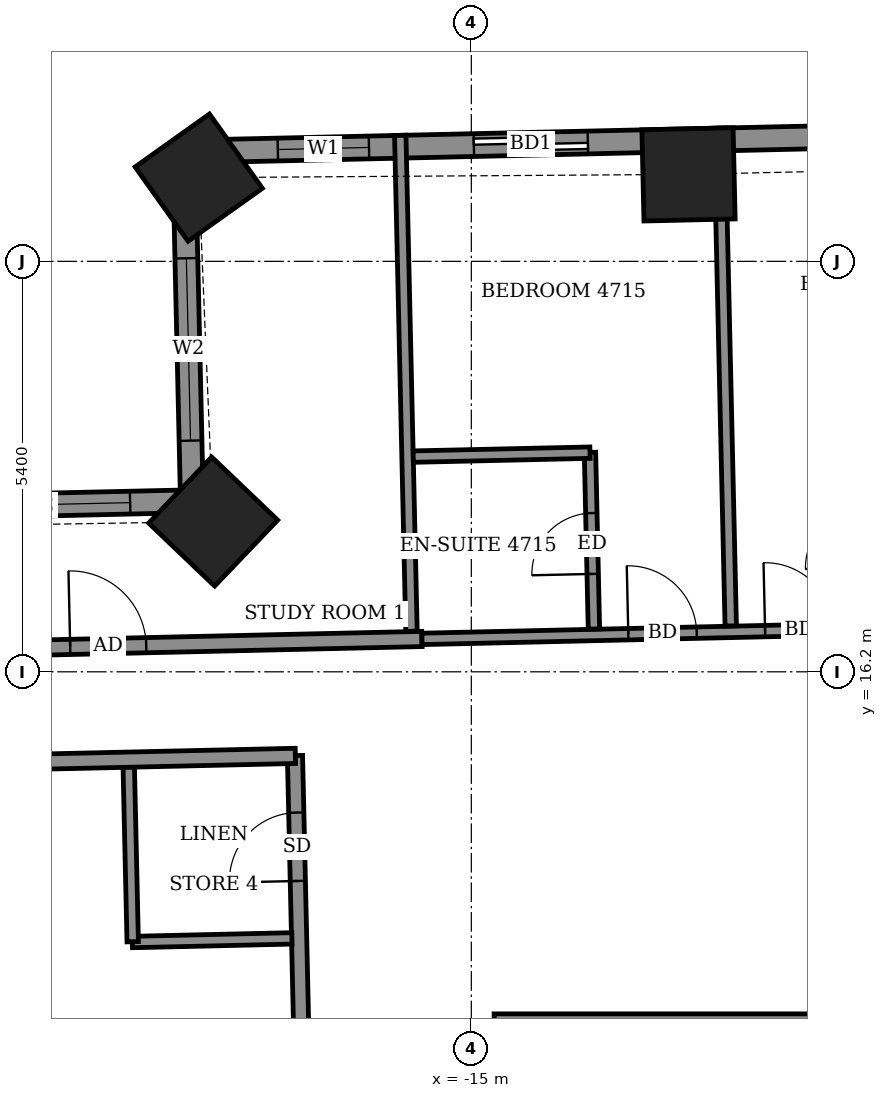
"""IFC4 building model, lengths in metres.
Left out: names, types, materials, properties, quantities, classifications, styles, units other than length and angle.
Written with IfcOpenShell. Run it as: python <this file> out.ifc"""

import sys

from ifc_helpers import new_model, si_unit, direction, frame, frame_2d, origin, origin_2d, place, context, subcontext, project, spatial, rectangle, extrude, element, fill, save


model = new_model("IFC4")
c1 = context("Model", 3, precision=1e-05, world=origin(), true_north=direction((0.0, 1.0)))
c2 = subcontext(c1, "Body", "Model", "MODEL_VIEW")
j1 = project(units=[si_unit("LENGTHUNIT", "METRE"), si_unit("PLANEANGLEUNIT", "RADIAN")], contexts=[c1])
p1 = place(None, origin())
s1 = spatial("IfcSite", under=j1, at=p1, CompositionType="ELEMENT")
p2 = place(p1, origin())
s2 = spatial("IfcBuilding", under=s1, at=p2, CompositionType="ELEMENT")
p3 = place(p2, frame((0.0, 0.0, 186.1)))
s3 = spatial("IfcBuildingStorey", under=s2, at=p3, CompositionType="ELEMENT", Elevation=186.1)
for number, where, z_axis, x_axis in (
    (1, (-12.142, 22.744, -0.55), (0.0, 0.0, 1.0), (-1.0, -0.023, 0.0)),
    (2, (-18.586, 22.701, -0.55), (0.0, 0.0, 1.0), (-0.815, -0.58, 0.0)),
    (3, (-18.396, 18.177, -0.55), (0.0, 0.0, 1.0), (-0.691, -0.723, 0.0)),
):
    element("IfcColumn", number, at=place(p3, frame(where, z_axis=z_axis, x_axis=x_axis)), inside=s3, PredefinedType="COLUMN", context=c2, shape_type="SweptSolid", body=[
        extrude(rectangle(XDim=1.2, YDim=1.2, at=origin_2d()), origin(), (0.0, 0.0, 1.0), 3.6),
    ])
p4 = place(p3, frame((21.589, 23.959, 0.0), z_axis=(0.0, 0.0, 1.0), x_axis=(-0.999742671382, -0.022684598702, 0.0)))
e4 = element("IfcWall", 4, at=p4, inside=s3, PredefinedType="SOLIDWALL", context=c2, shape_type="SweptSolid", body=[
    extrude(rectangle(XDim=40.381, YDim=0.3, at=frame_2d((20.19, 0.0))), origin(), (0.0, 0.0, 1.0), 3.05),
])
p5 = place(p4, frame((1.553, 0.0, 0.0)))
e5 = element("IfcOpeningElement", 5, at=p5, cuts=e4, PredefinedType="OPENING", context=c2, shape_type="SweptSolid", body=[
    extrude(rectangle(XDim=1.5, YDim=2.4, at=frame_2d((0.75, 1.2))), frame((0.0, 0.16, 0.0), z_axis=(0.0, -1.0, 0.0), x_axis=(1.0, 0.0, 0.0)), (0.0, 0.0, 1.0), 0.32),
])
p6 = place(p4, frame((4.33, 0.0, 0.0)))
e6 = element("IfcOpeningElement", 6, at=p6, cuts=e4, PredefinedType="OPENING", context=c2, shape_type="SweptSolid", body=[
    extrude(rectangle(XDim=1.5, YDim=2.4, at=frame_2d((0.75, 1.2))), frame((0.0, 0.16, 0.0), z_axis=(0.0, -1.0, 0.0), x_axis=(1.0, 0.0, 0.0)), (0.0, 0.0, 1.0), 0.32),
])
p7 = place(p4, frame((9.43, 0.0, 0.0)))
e7 = element("IfcOpeningElement", 7, at=p7, cuts=e4, PredefinedType="OPENING", context=c2, shape_type="SweptSolid", body=[
    extrude(rectangle(XDim=1.5, YDim=2.4, at=frame_2d((0.75, 1.2))), frame((0.0, 0.16, 0.0), z_axis=(0.0, -1.0, 0.0), x_axis=(1.0, 0.0, 0.0)), (0.0, 0.0, 1.0), 0.32),
])
p8 = place(p4, frame((14.37, 0.0, 0.0)))
e8 = element("IfcOpeningElement", 8, at=p8, cuts=e4, PredefinedType="OPENING", context=c2, shape_type="SweptSolid", body=[
    extrude(rectangle(XDim=1.5, YDim=2.4, at=frame_2d((0.75, 1.2))), frame((0.0, 0.16, 0.0), z_axis=(0.0, -1.0, 0.0), x_axis=(1.0, 0.0, 0.0)), (0.0, 0.0, 1.0), 0.32),
])
p9 = place(p4, frame((17.41, 0.0, 0.0)))
e9 = element("IfcOpeningElement", 9, at=p9, cuts=e4, PredefinedType="OPENING", context=c2, shape_type="SweptSolid", body=[
    extrude(rectangle(XDim=1.5, YDim=2.4, at=frame_2d((0.75, 1.2))), frame((0.0, 0.16, 0.0), z_axis=(0.0, -1.0, 0.0), x_axis=(1.0, 0.0, 0.0)), (0.0, 0.0, 1.0), 0.32),
])
p10 = place(p4, frame((22.03, 0.0, 0.0)))
e10 = element("IfcOpeningElement", 10, at=p10, cuts=e4, PredefinedType="OPENING", context=c2, shape_type="SweptSolid", body=[
    extrude(rectangle(XDim=1.5, YDim=2.4, at=frame_2d((0.75, 1.2))), frame((0.0, 0.16, 0.0), z_axis=(0.0, -1.0, 0.0), x_axis=(1.0, 0.0, 0.0)), (0.0, 0.0, 1.0), 0.32),
])
p11 = place(p4, frame((27.7, 0.0, 0.0)))
e11 = element("IfcOpeningElement", 11, at=p11, cuts=e4, PredefinedType="OPENING", context=c2, shape_type="SweptSolid", body=[
    extrude(rectangle(XDim=1.2, YDim=2.4, at=frame_2d((0.6, 1.2))), frame((0.0, 0.16, 0.0), z_axis=(0.0, -1.0, 0.0), x_axis=(1.0, 0.0, 0.0)), (0.0, 0.0, 1.0), 0.32),
])
p12 = place(p4, frame((30.48, 0.0, 0.0)))
e12 = element("IfcOpeningElement", 12, at=p12, cuts=e4, PredefinedType="OPENING", context=c2, shape_type="SweptSolid", body=[
    extrude(rectangle(XDim=1.5, YDim=2.4, at=frame_2d((0.75, 1.2))), frame((0.0, 0.16, 0.0), z_axis=(0.0, -1.0, 0.0), x_axis=(1.0, 0.0, 0.0)), (0.0, 0.0, 1.0), 0.32),
])
p13 = place(p4, frame((35.065, 0.0, 0.0)))
e13 = element("IfcOpeningElement", 13, at=p13, cuts=e4, PredefinedType="OPENING", context=c2, shape_type="SweptSolid", body=[
    extrude(rectangle(XDim=1.5, YDim=2.4, at=frame_2d((0.75, 1.2))), frame((0.0, 0.16, 0.0), z_axis=(0.0, -1.0, 0.0), x_axis=(1.0, 0.0, 0.0)), (0.0, 0.0, 1.0), 0.32),
])
p14 = place(p4, frame((37.945, 0.0, 0.9)))
e14 = element("IfcOpeningElement", 14, at=p14, cuts=e4, PredefinedType="OPENING", context=c2, shape_type="SweptSolid", body=[
    extrude(rectangle(XDim=1.2, YDim=1.5, at=frame_2d((0.6, 0.75))), frame((0.0, 0.16, 0.0), z_axis=(0.0, -1.0, 0.0), x_axis=(1.0, 0.0, 0.0)), (0.0, 0.0, 1.0), 0.32),
])
p15 = place(p3, frame((-18.781, 23.043, 0.0), z_axis=(0.0, 0.0, 1.0), x_axis=(0.022821468877, -0.999739556364, 0.0)))
e15 = element("IfcWall", 15, at=p15, inside=s3, PredefinedType="SOLIDWALL", context=c2, shape_type="SweptSolid", body=[
    extrude(rectangle(XDim=4.6, YDim=0.3, at=frame_2d((2.3, 0.0))), origin(), (0.0, 0.0, 1.0), 2.55),
])
p16 = place(p15, frame((1.403, 0.0, 0.9)))
e16 = element("IfcOpeningElement", 16, at=p16, cuts=e15, PredefinedType="OPENING", context=c2, shape_type="SweptSolid", body=[
    extrude(rectangle(XDim=2.4, YDim=1.5, at=frame_2d((1.2, 0.75))), frame((0.0, 0.16, 0.0), z_axis=(0.0, -1.0, 0.0), x_axis=(1.0, 0.0, 0.0)), (0.0, 0.0, 1.0), 0.32),
])
p17 = place(p3, frame((-18.676, 18.444, 0.0), z_axis=(0.0, 0.0, 1.0), x_axis=(-0.999744377441, -0.022609285172, 0.0)))
e17 = element("IfcWall", 17, at=p17, inside=s3, PredefinedType="SOLIDWALL", context=c2, shape_type="SweptSolid", body=[
    extrude(rectangle(XDim=4.6, YDim=0.3, at=frame_2d((2.3, 0.0))), origin(), (0.0, 0.0, 1.0), 2.55),
])
p18 = place(p17, frame((0.813, 0.0, 0.9)))
e18 = element("IfcOpeningElement", 18, at=p18, cuts=e17, PredefinedType="OPENING", context=c2, shape_type="SweptSolid", body=[
    extrude(rectangle(XDim=2.4, YDim=1.5, at=frame_2d((1.2, 0.75))), frame((0.0, 0.16, 0.0), z_axis=(0.0, -1.0, 0.0), x_axis=(1.0, 0.0, 0.0)), (0.0, 0.0, 1.0), 0.32),
])
p19 = place(p3, frame((-16.684, -12.919, 0.0), z_axis=(0.0, 0.0, 1.0), x_axis=(-0.022694293906, 0.999742451346, 0.0)))
e19 = element("IfcWall", 19, at=p19, inside=s3, PredefinedType="PARTITIONING", context=c2, shape_type="SweptSolid", body=[
    extrude(rectangle(XDim=28.024, YDim=0.2, at=frame_2d((14.012, 0.0))), origin(), (0.0, 0.0, 1.0), 3.05),
])
p20 = place(p19, frame((22.825, 0.0, 0.0)))
e20 = element("IfcOpeningElement", 20, at=p20, cuts=e19, PredefinedType="OPENING", context=c2, shape_type="SweptSolid", body=[
    extrude(rectangle(XDim=1.0, YDim=2.1, at=frame_2d((0.5, 1.05))), frame((0.0, 0.11, 0.0), z_axis=(0.0, -1.0, 0.0), x_axis=(1.0, 0.0, 0.0)), (0.0, 0.0, 1.0), 0.22),
])
p21 = place(p19, frame((26.374, 0.0, 0.0)))
e21 = element("IfcOpeningElement", 21, at=p21, cuts=e19, PredefinedType="OPENING", context=c2, shape_type="SweptSolid", body=[
    extrude(rectangle(XDim=0.9, YDim=2.1, at=frame_2d((0.45, 1.05))), frame((0.0, 0.11, 0.0), z_axis=(0.0, -1.0, 0.0), x_axis=(1.0, 0.0, 0.0)), (0.0, 0.0, 1.0), 0.22),
])
p22 = place(p19, frame((16.7, 0.0, 0.0)))
e22 = element("IfcOpeningElement", 22, at=p22, cuts=e19, PredefinedType="OPENING", context=c2, shape_type="SweptSolid", body=[
    extrude(rectangle(XDim=1.0, YDim=2.1, at=frame_2d((0.5, 1.05))), frame((0.0, 0.11, 0.0), z_axis=(0.0, -1.0, 0.0), x_axis=(1.0, 0.0, 0.0)), (0.0, 0.0, 1.0), 0.22),
])
p23 = place(p19, frame((19.175, 0.0, 0.0)))
e23 = element("IfcOpeningElement", 23, at=p23, cuts=e19, PredefinedType="OPENING", context=c2, shape_type="SweptSolid", body=[
    extrude(rectangle(XDim=0.9, YDim=2.1, at=frame_2d((0.45, 1.05))), frame((0.0, 0.11, 0.0), z_axis=(0.0, -1.0, 0.0), x_axis=(1.0, 0.0, 0.0)), (0.0, 0.0, 1.0), 0.22),
])
p24 = place(p19, frame((14.725, 0.0, 0.0)))
e24 = element("IfcOpeningElement", 24, at=p24, cuts=e19, PredefinedType="OPENING", context=c2, shape_type="SweptSolid", body=[
    extrude(rectangle(XDim=1.0, YDim=2.1, at=frame_2d((0.5, 1.05))), frame((0.0, 0.11, 0.0), z_axis=(0.0, -1.0, 0.0), x_axis=(1.0, 0.0, 0.0)), (0.0, 0.0, 1.0), 0.22),
])
p25 = place(p19, frame((12.625, 0.0, 0.0)))
e25 = element("IfcOpeningElement", 25, at=p25, cuts=e19, PredefinedType="OPENING", context=c2, shape_type="SweptSolid", body=[
    extrude(rectangle(XDim=0.9, YDim=2.1, at=frame_2d((0.45, 1.05))), frame((0.0, 0.11, 0.0), z_axis=(0.0, -1.0, 0.0), x_axis=(1.0, 0.0, 0.0)), (0.0, 0.0, 1.0), 0.22),
])
p26 = place(p19, frame((10.375, 0.0, 0.0)))
e26 = element("IfcOpeningElement", 26, at=p26, cuts=e19, PredefinedType="OPENING", context=c2, shape_type="SweptSolid", body=[
    extrude(rectangle(XDim=1.0, YDim=2.1, at=frame_2d((0.5, 1.05))), frame((0.0, 0.11, 0.0), z_axis=(0.0, -1.0, 0.0), x_axis=(1.0, 0.0, 0.0)), (0.0, 0.0, 1.0), 0.22),
])
p27 = place(p19, frame((8.125, 0.0, 0.0)))
e27 = element("IfcOpeningElement", 27, at=p27, cuts=e19, PredefinedType="OPENING", context=c2, shape_type="SweptSolid", body=[
    extrude(rectangle(XDim=0.9, YDim=2.1, at=frame_2d((0.45, 1.05))), frame((0.0, 0.11, 0.0), z_axis=(0.0, -1.0, 0.0), x_axis=(1.0, 0.0, 0.0)), (0.0, 0.0, 1.0), 0.22),
])
p28 = place(p19, frame((3.462, 0.0, 0.0)))
e28 = element("IfcOpeningElement", 28, at=p28, cuts=e19, PredefinedType="OPENING", context=c2, shape_type="SweptSolid", body=[
    extrude(rectangle(XDim=1.0, YDim=2.1, at=frame_2d((0.5, 1.05))), frame((0.0, 0.11, 0.0), z_axis=(0.0, -1.0, 0.0), x_axis=(1.0, 0.0, 0.0)), (0.0, 0.0, 1.0), 0.22),
])
p29 = place(p19, frame((5.625, 0.0, 0.0)))
e29 = element("IfcOpeningElement", 29, at=p29, cuts=e19, PredefinedType="OPENING", context=c2, shape_type="SweptSolid", body=[
    extrude(rectangle(XDim=0.9, YDim=2.1, at=frame_2d((0.45, 1.05))), frame((0.0, 0.11, 0.0), z_axis=(0.0, -1.0, 0.0), x_axis=(1.0, 0.0, 0.0)), (0.0, 0.0, 1.0), 0.22),
])
p30 = place(p3, frame((-19.46, 12.645, 0.0), z_axis=(0.0, 0.0, 1.0), x_axis=(0.999737799372, 0.022898307927, 0.0)))
e30 = element("IfcWall", 30, at=p30, inside=s3, PredefinedType="PARTITIONING", context=c2, shape_type="SweptSolid", body=[
    extrude(rectangle(XDim=2.1, YDim=0.15, at=frame_2d((1.05, 0.0))), origin(), (0.0, 0.0, 1.0), 3.05),
])
p31 = place(p3, frame((-19.455, 12.649, 0.0), z_axis=(0.0, 0.0, 1.0), x_axis=(-0.022603288534, 0.999744513037, 0.0)))
e31 = element("IfcWall", 31, at=p31, inside=s3, PredefinedType="PARTITIONING", context=c2, shape_type="SweptSolid", body=[
    extrude(rectangle(XDim=2.301, YDim=0.15, at=frame_2d((1.15, 0.0))), origin(), (0.0, 0.0, 1.0), 3.05),
])
p32 = place(p3, frame((-21.949, 14.989, 0.0), z_axis=(0.0, 0.0, 1.0), x_axis=(0.999743491588, 0.022648422179, 0.0)))
e32 = element("IfcWall", 32, at=p32, inside=s3, PredefinedType="PARTITIONING", context=c2, shape_type="SweptSolid", body=[
    extrude(rectangle(XDim=4.635, YDim=0.2, at=frame_2d((2.318, 0.0))), origin(), (0.0, 0.0, 1.0), 3.05),
])
p33 = place(p3, frame((-21.983, 16.489, 0.0), z_axis=(0.0, 0.0, 1.0), x_axis=(0.999744930163, 0.022584831499, 0.0)))
e33 = element("IfcWall", 33, at=p33, inside=s3, PredefinedType="PARTITIONING", context=c2, shape_type="SweptSolid", body=[
    extrude(rectangle(XDim=6.335, YDim=0.2, at=frame_2d((3.167, 0.0))), origin(), (0.0, 0.0, 1.0), 3.05),
])
p34 = place(p33, frame((1.706, 0.0, 0.0)))
e34 = element("IfcOpeningElement", 34, at=p34, cuts=e33, PredefinedType="OPENING", context=c2, shape_type="SweptSolid", body=[
    extrude(rectangle(XDim=1.0, YDim=2.1, at=frame_2d((0.5, 1.05))), frame((0.0, 0.11, 0.0), z_axis=(0.0, -1.0, 0.0), x_axis=(1.0, 0.0, 0.0)), (0.0, 0.0, 1.0), 0.22),
])
p35 = place(p3, frame((-15.649, 16.633, 0.0), z_axis=(0.0, 0.0, 1.0), x_axis=(0.999743261737, 0.022658565952, 0.0)))
e35 = element("IfcWall", 35, at=p35, inside=s3, PredefinedType="PARTITIONING", context=c2, shape_type="SweptSolid", body=[
    extrude(rectangle(XDim=30.536, YDim=0.15, at=frame_2d((15.268, 0.0))), origin(), (0.0, 0.0, 1.0), 3.05),
])
p36 = place(p35, frame((29.536, 0.0, 0.0)))
e36 = element("IfcOpeningElement", 36, at=p36, cuts=e35, PredefinedType="OPENING", context=c2, shape_type="SweptSolid", body=[
    extrude(rectangle(XDim=0.9, YDim=2.1, at=frame_2d((0.45, 1.05))), frame((0.0, 0.085, 0.0), z_axis=(0.0, -1.0, 0.0), x_axis=(1.0, 0.0, 0.0)), (0.0, 0.0, 1.0), 0.17),
])
p37 = place(p35, frame((27.965, 0.0, 0.0)))
e37 = element("IfcOpeningElement", 37, at=p37, cuts=e35, PredefinedType="OPENING", context=c2, shape_type="SweptSolid", body=[
    extrude(rectangle(XDim=0.9, YDim=2.1, at=frame_2d((0.45, 1.05))), frame((0.0, 0.085, 0.0), z_axis=(0.0, -1.0, 0.0), x_axis=(1.0, 0.0, 0.0)), (0.0, 0.0, 1.0), 0.17),
])
p38 = place(p35, frame((21.365, 0.0, 0.0)))
e38 = element("IfcOpeningElement", 38, at=p38, cuts=e35, PredefinedType="OPENING", context=c2, shape_type="SweptSolid", body=[
    extrude(rectangle(XDim=0.9, YDim=2.1, at=frame_2d((0.45, 1.05))), frame((0.0, 0.085, 0.0), z_axis=(0.0, -1.0, 0.0), x_axis=(1.0, 0.0, 0.0)), (0.0, 0.0, 1.0), 0.17),
])
p39 = place(p35, frame((19.565, 0.0, 0.0)))
e39 = element("IfcOpeningElement", 39, at=p39, cuts=e35, PredefinedType="OPENING", context=c2, shape_type="SweptSolid", body=[
    extrude(rectangle(XDim=0.9, YDim=2.1, at=frame_2d((0.45, 1.05))), frame((0.0, 0.085, 0.0), z_axis=(0.0, -1.0, 0.0), x_axis=(1.0, 0.0, 0.0)), (0.0, 0.0, 1.0), 0.17),
])
p40 = place(p35, frame((12.965, 0.0, 0.0)))
e40 = element("IfcOpeningElement", 40, at=p40, cuts=e35, PredefinedType="OPENING", context=c2, shape_type="SweptSolid", body=[
    extrude(rectangle(XDim=0.9, YDim=2.1, at=frame_2d((0.45, 1.05))), frame((0.0, 0.085, 0.0), z_axis=(0.0, -1.0, 0.0), x_axis=(1.0, 0.0, 0.0)), (0.0, 0.0, 1.0), 0.17),
])
p41 = place(p35, frame((11.14, 0.0, 0.0)))
e41 = element("IfcOpeningElement", 41, at=p41, cuts=e35, PredefinedType="OPENING", context=c2, shape_type="SweptSolid", body=[
    extrude(rectangle(XDim=0.9, YDim=2.1, at=frame_2d((0.45, 1.05))), frame((0.0, 0.085, 0.0), z_axis=(0.0, -1.0, 0.0), x_axis=(1.0, 0.0, 0.0)), (0.0, 0.0, 1.0), 0.17),
])
p42 = place(p35, frame((4.515, 0.0, 0.0)))
e42 = element("IfcOpeningElement", 42, at=p42, cuts=e35, PredefinedType="OPENING", context=c2, shape_type="SweptSolid", body=[
    extrude(rectangle(XDim=0.9, YDim=2.1, at=frame_2d((0.45, 1.05))), frame((0.0, 0.085, 0.0), z_axis=(0.0, -1.0, 0.0), x_axis=(1.0, 0.0, 0.0)), (0.0, 0.0, 1.0), 0.17),
])
p43 = place(p35, frame((2.715, 0.0, 0.0)))
e43 = element("IfcOpeningElement", 43, at=p43, cuts=e35, PredefinedType="OPENING", context=c2, shape_type="SweptSolid", body=[
    extrude(rectangle(XDim=0.9, YDim=2.1, at=frame_2d((0.45, 1.05))), frame((0.0, 0.085, 0.0), z_axis=(0.0, -1.0, 0.0), x_axis=(1.0, 0.0, 0.0)), (0.0, 0.0, 1.0), 0.17),
])
p44 = place(p3, frame((-15.787, 16.733, 0.0), z_axis=(0.0, 0.0, 1.0), x_axis=(-0.022667874761, 0.999743050715, 0.0)))
e44 = element("IfcWall", 44, at=p44, inside=s3, PredefinedType="PARTITIONING", context=c2, shape_type="SweptSolid", body=[
    extrude(rectangle(XDim=6.527, YDim=0.15, at=frame_2d((3.263, 0.0))), origin(), (0.0, 0.0, 1.0), 2.55),
])
p45 = place(p3, frame((-13.387, 16.763, 0.0), z_axis=(0.0, 0.0, 1.0), x_axis=(-0.022370700241, 0.999749744571, 0.0)))
e45 = element("IfcWall", 45, at=p45, inside=s3, PredefinedType="PARTITIONING", context=c2, shape_type="SweptSolid", body=[
    extrude(rectangle(XDim=2.324, YDim=0.15, at=frame_2d((1.162, 0.0))), origin(), (0.0, 0.0, 1.0), 3.05),
])
p46 = place(p45, frame((0.725, 0.0, 0.0)))
e46 = element("IfcOpeningElement", 46, at=p46, cuts=e45, PredefinedType="OPENING", context=c2, shape_type="SweptSolid", body=[
    extrude(rectangle(XDim=0.8, YDim=2.1, at=frame_2d((0.4, 1.05))), frame((0.0, 0.085, 0.0), z_axis=(0.0, -1.0, 0.0), x_axis=(1.0, 0.0, 0.0)), (0.0, 0.0, 1.0), 0.17),
])
p47 = place(p3, frame((-11.587, 16.804, 0.0), z_axis=(0.0, 0.0, 1.0), x_axis=(-0.022771353855, 0.999740699103, 0.0)))
e47 = element("IfcWall", 47, at=p47, inside=s3, PredefinedType="PARTITIONING", context=c2, shape_type="SweptSolid", body=[
    extrude(rectangle(XDim=6.551, YDim=0.15, at=frame_2d((3.275, 0.0))), origin(), (0.0, 0.0, 1.0), 3.05),
])
p48 = place(p3, frame((-15.764, 19.031, 0.0), z_axis=(0.0, 0.0, 1.0), x_axis=(0.999749954681, 0.022361308448, 0.0)))
e48 = element("IfcWall", 48, at=p48, inside=s3, PredefinedType="PARTITIONING", context=c2, shape_type="SweptSolid", body=[
    extrude(rectangle(XDim=2.325, YDim=0.15, at=frame_2d((1.163, 0.0))), origin(), (0.0, 0.0, 1.0), 3.05),
])
p49 = place(p3, frame((-14.7, 11.25, 0.0), z_axis=(0.0, 0.0, 1.0), x_axis=(1.0, 0.0, 0.0)))
e49 = element("IfcWall", 49, at=p49, inside=s3, PredefinedType="SHEAR", context=c2, shape_type="SweptSolid", body=[
    extrude(rectangle(XDim=29.4, YDim=0.9, at=frame_2d((14.7, 0.0))), origin(), (0.0, 0.0, 1.0), 3.6),
])
p50 = place(p13, origin())
e50 = element("IfcDoor", 50, at=p50, inside=s3, OperationType="SLIDING_TO_LEFT", PredefinedType="DOOR", context=c2, shape_type="SweptSolid", body=[
    extrude(rectangle(XDim=1.5, YDim=2.4, at=frame_2d((0.75, 1.2))), frame((0.0, 0.025, 0.0), z_axis=(0.0, -1.0, 0.0), x_axis=(1.0, 0.0, 0.0)), (0.0, 0.0, 1.0), 0.05),
])
fill(e13, e50)
p51 = place(p14, origin())
e51 = element("IfcWindow", 51, at=p51, inside=s3, PartitioningType="SINGLE_PANEL", PredefinedType="WINDOW", context=c2, shape_type="SweptSolid", body=[
    extrude(rectangle(XDim=1.2, YDim=1.5, at=frame_2d((0.6, 0.75))), frame((0.0, 0.03, 0.0), z_axis=(0.0, -1.0, 0.0), x_axis=(1.0, 0.0, 0.0)), (0.0, 0.0, 1.0), 0.06),
])
fill(e14, e51)
p52 = place(p16, origin())
e52 = element("IfcWindow", 52, at=p52, inside=s3, PartitioningType="DOUBLE_PANEL_VERTICAL", PredefinedType="WINDOW", context=c2, shape_type="SweptSolid", body=[
    extrude(rectangle(XDim=2.4, YDim=1.5, at=frame_2d((1.2, 0.75))), frame((0.0, 0.03, 0.0), z_axis=(0.0, -1.0, 0.0), x_axis=(1.0, 0.0, 0.0)), (0.0, 0.0, 1.0), 0.06),
])
fill(e16, e52)
p53 = place(p18, origin())
e53 = element("IfcWindow", 53, at=p53, inside=s3, PartitioningType="DOUBLE_PANEL_VERTICAL", PredefinedType="WINDOW", context=c2, shape_type="SweptSolid", body=[
    extrude(rectangle(XDim=2.4, YDim=1.5, at=frame_2d((1.2, 0.75))), frame((0.0, 0.03, 0.0), z_axis=(0.0, -1.0, 0.0), x_axis=(1.0, 0.0, 0.0)), (0.0, 0.0, 1.0), 0.06),
])
fill(e18, e53)
p54 = place(p42, origin())
e54 = element("IfcDoor", 54, at=p54, inside=s3, OperationType="SINGLE_SWING_RIGHT", PredefinedType="DOOR", context=c2, shape_type="SweptSolid", body=[
    extrude(rectangle(XDim=0.9, YDim=2.1, at=frame_2d((0.45, 1.05))), frame((0.0, 0.025, 0.0), z_axis=(0.0, -1.0, 0.0), x_axis=(1.0, 0.0, 0.0)), (0.0, 0.0, 1.0), 0.05),
])
fill(e42, e54)
p55 = place(p43, origin())
e55 = element("IfcDoor", 55, at=p55, inside=s3, OperationType="SINGLE_SWING_LEFT", PredefinedType="DOOR", context=c2, shape_type="SweptSolid", body=[
    extrude(rectangle(XDim=0.9, YDim=2.1, at=frame_2d((0.45, 1.05))), frame((0.0, 0.025, 0.0), z_axis=(0.0, -1.0, 0.0), x_axis=(1.0, 0.0, 0.0)), (0.0, 0.0, 1.0), 0.05),
])
fill(e43, e55)
p56 = place(p46, origin())
e56 = element("IfcDoor", 56, at=p56, inside=s3, OperationType="SINGLE_SWING_LEFT", PredefinedType="DOOR", context=c2, shape_type="SweptSolid", body=[
    extrude(rectangle(XDim=0.8, YDim=2.1, at=frame_2d((0.4, 1.05))), frame((0.0, 0.025, 0.0), z_axis=(0.0, -1.0, 0.0), x_axis=(1.0, 0.0, 0.0)), (0.0, 0.0, 1.0), 0.05),
])
fill(e46, e56)
p57 = place(p34, origin())
e57 = element("IfcDoor", 57, at=p57, inside=s3, OperationType="SINGLE_SWING_LEFT", PredefinedType="DOOR", context=c2, shape_type="SweptSolid", body=[
    extrude(rectangle(XDim=1.0, YDim=2.1, at=frame_2d((0.5, 1.05))), frame((0.0, 0.025, 0.0), z_axis=(0.0, -1.0, 0.0), x_axis=(1.0, 0.0, 0.0)), (0.0, 0.0, 1.0), 0.05),
])
fill(e34, e57)
p58 = place(p21, origin())
e58 = element("IfcDoor", 58, at=p58, inside=s3, OperationType="SINGLE_SWING_RIGHT", PredefinedType="DOOR", context=c2, shape_type="SweptSolid", body=[
    extrude(rectangle(XDim=0.9, YDim=2.1, at=frame_2d((0.45, 1.05))), frame((0.0, 0.025, 0.0), z_axis=(0.0, -1.0, 0.0), x_axis=(1.0, 0.0, 0.0)), (0.0, 0.0, 1.0), 0.05),
])
fill(e21, e58)
save(model, sys.argv[1])
